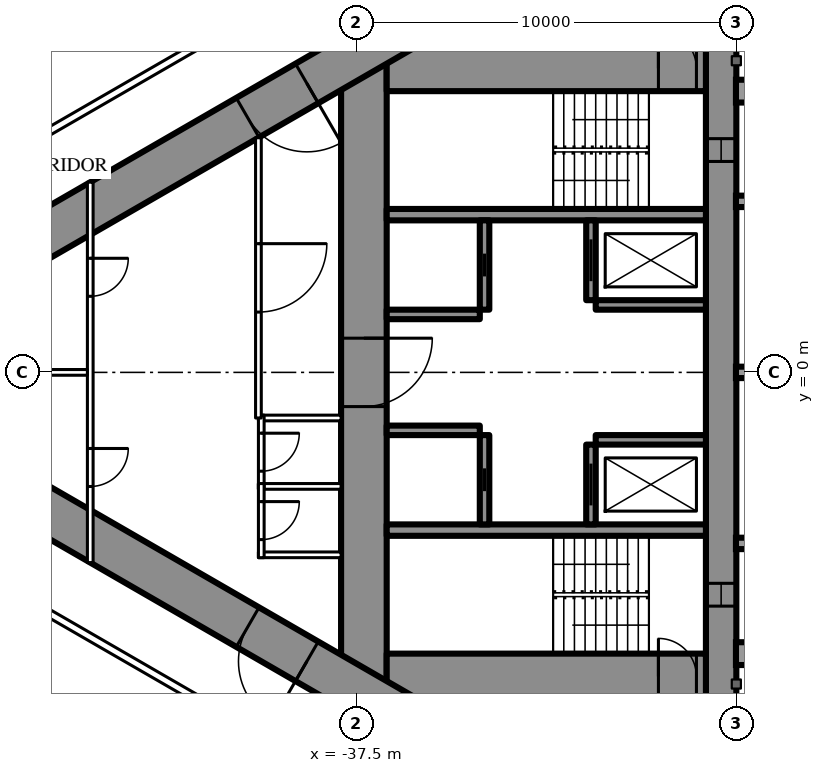
"""IFC4 building model, lengths in metres.
Left out: names, types, materials, properties, quantities, classifications, styles, units other than length and angle.
Written with IfcOpenShell. Run it as: python <this file> out.ifc"""

import sys

from ifc_helpers import new_model, si_unit, direction, frame, frame_2d, origin, place, context, subcontext, project, spatial, rectangle, extrude, element, fill, save


model = new_model("IFC4")
c1 = context("Model", 3, precision=1e-05, world=origin(), true_north=direction((0.0, 1.0)))
c2 = subcontext(c1, "Body", "Model", "MODEL_VIEW")
j1 = project(units=[si_unit("LENGTHUNIT", "METRE"), si_unit("PLANEANGLEUNIT", "RADIAN")], contexts=[c1])
p1 = place(None, origin())
s1 = spatial("IfcSite", under=j1, at=p1, CompositionType="ELEMENT")
p2 = place(p1, origin())
s2 = spatial("IfcBuilding", under=s1, at=p2, CompositionType="ELEMENT")
p3 = place(p2, frame((0.0, 0.0, 111.6)))
s3 = spatial("IfcBuildingStorey", under=s2, at=p3, CompositionType="ELEMENT", Elevation=111.6)
p4 = place(p3, frame((-27.9, 8.6, 0.0), z_axis=(0.0, 0.0, 1.0), x_axis=(0.0, -1.0, 0.0)))
e1 = element("IfcWall", 1, at=p4, inside=s3, PredefinedType="SHEAR", context=c2, shape_type="SweptSolid", body=[
    extrude(rectangle(XDim=17.2, YDim=0.8, at=frame_2d((8.6, 0.0))), origin(), (0.0, 0.0, 1.0), 3.5),
])
p5 = place(p4, frame((2.45, 0.0, 0.6)))
e2 = element("IfcOpeningElement", 2, at=p5, cuts=e1, PredefinedType="OPENING", context=c2, shape_type="SweptSolid", body=[
    extrude(rectangle(XDim=0.6, YDim=2.1, at=frame_2d((0.3, 1.05))), frame((0.0, 0.41, 0.0), z_axis=(0.0, -1.0, 0.0), x_axis=(1.0, 0.0, 0.0)), (0.0, 0.0, 1.0), 0.82),
])
p6 = place(p4, frame((14.15, 0.0, 0.6)))
e3 = element("IfcOpeningElement", 3, at=p6, cuts=e1, PredefinedType="OPENING", context=c2, shape_type="SweptSolid", body=[
    extrude(rectangle(XDim=0.6, YDim=2.1, at=frame_2d((0.3, 1.05))), frame((0.0, 0.41, 0.0), z_axis=(0.0, -1.0, 0.0), x_axis=(1.0, 0.0, 0.0)), (0.0, 0.0, 1.0), 0.82),
])
p7 = place(p3, frame((-37.3, 8.6, 0.0), z_axis=(0.0, 0.0, 1.0), x_axis=(0.0, -1.0, 0.0)))
e4 = element("IfcWall", 4, at=p7, inside=s3, PredefinedType="SHEAR", context=c2, shape_type="SweptSolid", body=[
    extrude(rectangle(XDim=17.2, YDim=1.2, at=frame_2d((8.6, 0.0))), origin(), (0.0, 0.0, 1.0), 3.5),
])
p8 = place(p7, frame((7.7, 0.0, 0.0)))
e5 = element("IfcOpeningElement", 5, at=p8, cuts=e4, PredefinedType="OPENING", context=c2, shape_type="SweptSolid", body=[
    extrude(rectangle(XDim=1.8, YDim=2.2, at=frame_2d((0.9, 1.1))), frame((0.0, 0.61, 0.0), z_axis=(0.0, -1.0, 0.0), x_axis=(1.0, 0.0, 0.0)), (0.0, 0.0, 1.0), 1.22),
])
p9 = place(p3, frame((-28.3, 8.0, 0.0), z_axis=(0.0, 0.0, 1.0), x_axis=(-1.0, 0.0, 0.0)))
e6 = element("IfcWall", 6, at=p9, inside=s3, PredefinedType="SHEAR", context=c2, shape_type="SweptSolid", body=[
    extrude(rectangle(XDim=8.4, YDim=1.2, at=frame_2d((4.2, 0.0))), origin(), (0.0, 0.0, 1.0), 3.5),
])
p10 = place(p9, frame((0.25, 0.0, 0.0)))
e7 = element("IfcOpeningElement", 7, at=p10, cuts=e6, PredefinedType="OPENING", context=c2, shape_type="SweptSolid", body=[
    extrude(rectangle(XDim=1.0, YDim=2.2, at=frame_2d((0.5, 1.1))), frame((0.0, 0.61, 0.0), z_axis=(0.0, -1.0, 0.0), x_axis=(1.0, 0.0, 0.0)), (0.0, 0.0, 1.0), 1.22),
])
p11 = place(p3, frame((-28.3, -8.0, 0.0), z_axis=(0.0, 0.0, 1.0), x_axis=(-1.0, 0.0, 0.0)))
e8 = element("IfcWall", 8, at=p11, inside=s3, PredefinedType="SHEAR", context=c2, shape_type="SweptSolid", body=[
    extrude(rectangle(XDim=8.4, YDim=1.2, at=frame_2d((4.2, 0.0))), origin(), (0.0, 0.0, 1.0), 3.5),
])
p12 = place(p11, frame((0.25, 0.0, 0.0)))
e9 = element("IfcOpeningElement", 9, at=p12, cuts=e8, PredefinedType="OPENING", context=c2, shape_type="SweptSolid", body=[
    extrude(rectangle(XDim=1.0, YDim=2.2, at=frame_2d((0.5, 1.1))), frame((0.0, 0.61, 0.0), z_axis=(0.0, -1.0, 0.0), x_axis=(1.0, 0.0, 0.0)), (0.0, 0.0, 1.0), 1.22),
])
for number, where, z_axis, x_axis in (
    (10, (-28.3, 4.15, 0.0), (0.0, 0.0, 1.0), (-1.0, 0.0, 0.0)),
    (11, (-28.3, -4.15, 0.0), (0.0, 0.0, 1.0), (-1.0, 0.0, 0.0)),
):
    element("IfcWall", number, at=place(p3, frame(where, z_axis=z_axis, x_axis=x_axis)), inside=s3, PredefinedType="SHEAR", context=c2, shape_type="SweptSolid", body=[
        extrude(rectangle(XDim=8.4, YDim=0.3, at=frame_2d((4.2, 0.0))), origin(), (0.0, 0.0, 1.0), 3.5),
    ])
p13 = place(p3, frame((-31.325, 4.0, 0.0), z_axis=(0.0, 0.0, 1.0), x_axis=(0.0, -1.0, 0.0)))
e12 = element("IfcWall", 12, at=p13, inside=s3, PredefinedType="SHEAR", context=c2, shape_type="SweptSolid", body=[
    extrude(rectangle(XDim=2.1, YDim=0.25, at=frame_2d((1.05, 0.0))), origin(), (0.0, 0.0, 1.0), 3.5),
])
p14 = place(p13, frame((0.5, 0.0, 0.0)))
e13 = element("IfcOpeningElement", 13, at=p14, cuts=e12, PredefinedType="OPENING", context=c2, shape_type="SweptSolid", body=[
    extrude(rectangle(XDim=1.1, YDim=2.2, at=frame_2d((0.55, 1.1))), frame((0.0, 0.135, 0.0), z_axis=(0.0, -1.0, 0.0), x_axis=(1.0, 0.0, 0.0)), (0.0, 0.0, 1.0), 0.27),
])
p15 = place(p3, frame((-34.125, 4.0, 0.0), z_axis=(0.0, 0.0, 1.0), x_axis=(0.0, -1.0, 0.0)))
e14 = element("IfcWall", 14, at=p15, inside=s3, PredefinedType="SHEAR", context=c2, shape_type="SweptSolid", body=[
    extrude(rectangle(XDim=2.35, YDim=0.25, at=frame_2d((1.175, 0.0))), origin(), (0.0, 0.0, 1.0), 3.5),
])
p16 = place(p15, frame((0.875, 0.0, 0.0)))
e15 = element("IfcOpeningElement", 15, at=p16, cuts=e14, PredefinedType="OPENING", context=c2, shape_type="SweptSolid", body=[
    extrude(rectangle(XDim=0.6, YDim=2.0, at=frame_2d((0.3, 1.0))), frame((0.0, 0.135, 0.0), z_axis=(0.0, -1.0, 0.0), x_axis=(1.0, 0.0, 0.0)), (0.0, 0.0, 1.0), 0.27),
])
p17 = place(p3, frame((-28.3, 1.775, 0.0), z_axis=(0.0, 0.0, 1.0), x_axis=(-1.0, 0.0, 0.0)))
e16 = element("IfcWall", 16, at=p17, inside=s3, PredefinedType="SHEAR", context=c2, shape_type="SweptSolid", body=[
    extrude(rectangle(XDim=2.9, YDim=0.25, at=frame_2d((1.45, 0.0))), origin(), (0.0, 0.0, 1.0), 3.5),
])
p18 = place(p3, frame((-34.25, 1.525, 0.0), z_axis=(0.0, 0.0, 1.0), x_axis=(-1.0, 0.0, 0.0)))
e17 = element("IfcWall", 17, at=p18, inside=s3, PredefinedType="SHEAR", context=c2, shape_type="SweptSolid", body=[
    extrude(rectangle(XDim=2.45, YDim=0.25, at=frame_2d((1.225, 0.0))), origin(), (0.0, 0.0, 1.0), 3.5),
])
p19 = place(p3, frame((-31.325, -1.9, 0.0), z_axis=(0.0, 0.0, 1.0), x_axis=(0.0, -1.0, 0.0)))
e18 = element("IfcWall", 18, at=p19, inside=s3, PredefinedType="SHEAR", context=c2, shape_type="SweptSolid", body=[
    extrude(rectangle(XDim=2.1, YDim=0.25, at=frame_2d((1.05, 0.0))), origin(), (0.0, 0.0, 1.0), 3.5),
])
p20 = place(p19, frame((0.5, 0.0, 0.0)))
e19 = element("IfcOpeningElement", 19, at=p20, cuts=e18, PredefinedType="OPENING", context=c2, shape_type="SweptSolid", body=[
    extrude(rectangle(XDim=1.1, YDim=2.2, at=frame_2d((0.55, 1.1))), frame((0.0, 0.135, 0.0), z_axis=(0.0, -1.0, 0.0), x_axis=(1.0, 0.0, 0.0)), (0.0, 0.0, 1.0), 0.27),
])
p21 = place(p3, frame((-34.125, -1.65, 0.0), z_axis=(0.0, 0.0, 1.0), x_axis=(0.0, -1.0, 0.0)))
e20 = element("IfcWall", 20, at=p21, inside=s3, PredefinedType="SHEAR", context=c2, shape_type="SweptSolid", body=[
    extrude(rectangle(XDim=2.35, YDim=0.25, at=frame_2d((1.175, 0.0))), origin(), (0.0, 0.0, 1.0), 3.5),
])
p22 = place(p21, frame((0.875, 0.0, 0.0)))
e21 = element("IfcOpeningElement", 21, at=p22, cuts=e20, PredefinedType="OPENING", context=c2, shape_type="SweptSolid", body=[
    extrude(rectangle(XDim=0.6, YDim=2.0, at=frame_2d((0.3, 1.0))), frame((0.0, 0.135, 0.0), z_axis=(0.0, -1.0, 0.0), x_axis=(1.0, 0.0, 0.0)), (0.0, 0.0, 1.0), 0.27),
])
p23 = place(p3, frame((-28.3, -1.775, 0.0), z_axis=(0.0, 0.0, 1.0), x_axis=(-1.0, 0.0, 0.0)))
e22 = element("IfcWall", 22, at=p23, inside=s3, PredefinedType="SHEAR", context=c2, shape_type="SweptSolid", body=[
    extrude(rectangle(XDim=2.9, YDim=0.25, at=frame_2d((1.45, 0.0))), origin(), (0.0, 0.0, 1.0), 3.5),
])
p24 = place(p3, frame((-34.25, -1.525, 0.0), z_axis=(0.0, 0.0, 1.0), x_axis=(-1.0, 0.0, 0.0)))
e23 = element("IfcWall", 23, at=p24, inside=s3, PredefinedType="SHEAR", context=c2, shape_type="SweptSolid", body=[
    extrude(rectangle(XDim=2.45, YDim=0.25, at=frame_2d((1.225, 0.0))), origin(), (0.0, 0.0, 1.0), 3.5),
])
p25 = place(p3, frame((-27.2, 14.3, 0.0), z_axis=(0.0, 0.0, 1.0), x_axis=(-0.866026593062, -0.499997940104, 0.0)))
e24 = element("IfcWall", 24, at=p25, inside=s3, PredefinedType="SHEAR", context=c2, shape_type="SweptSolid", body=[
    extrude(rectangle(XDim=28.946, YDim=1.2, at=frame_2d((14.473, 0.0))), origin(), (0.0, 0.0, 1.0), 3.5),
])
p26 = place(p25, frame((4.6, 0.0, 0.0)))
e25 = element("IfcOpeningElement", 25, at=p26, cuts=e24, PredefinedType="OPENING", context=c2, shape_type="SweptSolid", body=[
    extrude(rectangle(XDim=1.0, YDim=2.2, at=frame_2d((0.5, 1.1))), frame((0.0, 0.61, 0.0), z_axis=(0.0, -1.0, 0.0), x_axis=(1.0, 0.0, 0.0)), (0.0, 0.0, 1.0), 1.22),
])
p27 = place(p25, frame((13.395, 0.0, 0.0)))
e26 = element("IfcOpeningElement", 26, at=p27, cuts=e24, PredefinedType="OPENING", context=c2, shape_type="SweptSolid", body=[
    extrude(rectangle(XDim=1.8, YDim=2.2, at=frame_2d((0.9, 1.1))), frame((0.0, 0.61, 0.0), z_axis=(0.0, -1.0, 0.0), x_axis=(1.0, 0.0, 0.0)), (0.0, 0.0, 1.0), 1.22),
])
p28 = place(p3, frame((-27.2, -14.3, 0.0), z_axis=(0.0, 0.0, 1.0), x_axis=(-0.866024021859, 0.500002393557, 0.0)))
e27 = element("IfcWall", 27, at=p28, inside=s3, PredefinedType="SHEAR", context=c2, shape_type="SweptSolid", body=[
    extrude(rectangle(XDim=27.907, YDim=1.2, at=frame_2d((13.954, 0.0))), origin(), (0.0, 0.0, 1.0), 3.5),
])
p29 = place(p28, frame((4.6, 0.0, 0.0)))
e28 = element("IfcOpeningElement", 28, at=p29, cuts=e27, PredefinedType="OPENING", context=c2, shape_type="SweptSolid", body=[
    extrude(rectangle(XDim=1.0, YDim=2.2, at=frame_2d((0.5, 1.1))), frame((0.0, 0.61, 0.0), z_axis=(0.0, -1.0, 0.0), x_axis=(1.0, 0.0, 0.0)), (0.0, 0.0, 1.0), 1.22),
])
p30 = place(p28, frame((13.395, 0.0, 0.0)))
e29 = element("IfcOpeningElement", 29, at=p30, cuts=e27, PredefinedType="OPENING", context=c2, shape_type="SweptSolid", body=[
    extrude(rectangle(XDim=1.8, YDim=2.2, at=frame_2d((0.9, 1.1))), frame((0.0, 0.61, 0.0), z_axis=(0.0, -1.0, 0.0), x_axis=(1.0, 0.0, 0.0)), (0.0, 0.0, 1.0), 1.22),
])
p31 = place(p3, frame((-37.7, 10.894, 0.0), z_axis=(0.0, 0.0, 1.0), x_axis=(-0.866027905338, -0.499995667157, 0.0)))
e30 = element("IfcWall", 30, at=p31, inside=s3, PredefinedType="PARTITIONING", context=c2, shape_type="SweptSolid", body=[
    extrude(rectangle(XDim=21.787, YDim=0.2, at=frame_2d((10.894, 0.0))), origin(), (0.0, 0.0, 1.0), 3.25),
])
p32 = place(p31, frame((11.23, 0.0, 0.0)))
e31 = element("IfcOpeningElement", 31, at=p32, cuts=e30, PredefinedType="OPENING", context=c2, shape_type="SweptSolid", body=[
    extrude(rectangle(XDim=0.95, YDim=2.2, at=frame_2d((0.475, 1.1))), frame((0.0, 0.11, 0.0), z_axis=(0.0, -1.0, 0.0), x_axis=(1.0, 0.0, 0.0)), (0.0, 0.0, 1.0), 0.22),
])
p33 = place(p31, frame((9.531, 0.0, 0.0)))
e32 = element("IfcOpeningElement", 32, at=p33, cuts=e30, PredefinedType="OPENING", context=c2, shape_type="SweptSolid", body=[
    extrude(rectangle(XDim=0.95, YDim=2.2, at=frame_2d((0.475, 1.1))), frame((0.0, 0.11, 0.0), z_axis=(0.0, -1.0, 0.0), x_axis=(1.0, 0.0, 0.0)), (0.0, 0.0, 1.0), 0.22),
])
p34 = place(p3, frame((-36.92, -11.344, 0.0), z_axis=(0.0, 0.0, 1.0), x_axis=(-0.866027897759, 0.499995680284, 0.0)))
e33 = element("IfcWall", 33, at=p34, inside=s3, PredefinedType="PARTITIONING", context=c2, shape_type="SweptSolid", body=[
    extrude(rectangle(XDim=11.731, YDim=0.2, at=frame_2d((5.865, 0.0))), origin(), (0.0, 0.0, 1.0), 3.25),
])
p35 = place(p34, frame((3.35, 0.0, 0.0)))
e34 = element("IfcOpeningElement", 34, at=p35, cuts=e33, PredefinedType="OPENING", context=c2, shape_type="SweptSolid", body=[
    extrude(rectangle(XDim=1.0, YDim=2.2, at=frame_2d((0.5, 1.1))), frame((0.0, 0.11, 0.0), z_axis=(0.0, -1.0, 0.0), x_axis=(1.0, 0.0, 0.0)), (0.0, 0.0, 1.0), 0.22),
])
for number, where, z_axis, x_axis in (
    (35, (-37.9, -1.2, 0.0), (0.0, 0.0, 1.0), (-1.0, 0.0, 0.0)),
    (36, (-37.9, -3.0, 0.0), (0.0, 0.0, 1.0), (-1.0, 0.0, 0.0)),
    (37, (-37.9, -4.8, 0.0), (0.0, 0.0, 1.0), (-1.0, 0.0, 0.0)),
):
    element("IfcWall", number, at=place(p3, frame(where, z_axis=z_axis, x_axis=x_axis)), inside=s3, PredefinedType="PARTITIONING", context=c2, shape_type="SweptSolid", body=[
        extrude(rectangle(XDim=2.175, YDim=0.15, at=frame_2d((1.087, 0.0))), origin(), (0.0, 0.0, 1.0), 3.25),
    ])
p36 = place(p3, frame((-40.0, -1.125, 0.0), z_axis=(0.0, 0.0, 1.0), x_axis=(0.0, -1.0, 0.0)))
e38 = element("IfcWall", 38, at=p36, inside=s3, PredefinedType="PARTITIONING", context=c2, shape_type="SweptSolid", body=[
    extrude(rectangle(XDim=1.95, YDim=0.15, at=frame_2d((0.975, 0.0))), origin(), (0.0, 0.0, 1.0), 3.25),
])
p37 = place(p36, frame((0.475, 0.0, 0.0)))
e39 = element("IfcOpeningElement", 39, at=p37, cuts=e38, PredefinedType="OPENING", context=c2, shape_type="SweptSolid", body=[
    extrude(rectangle(XDim=1.0, YDim=2.2, at=frame_2d((0.5, 1.1))), frame((0.0, 0.085, 0.0), z_axis=(0.0, -1.0, 0.0), x_axis=(1.0, 0.0, 0.0)), (0.0, 0.0, 1.0), 0.17),
])
p38 = place(p3, frame((-40.0, -2.925, 0.0), z_axis=(0.0, 0.0, 1.0), x_axis=(0.0, -1.0, 0.0)))
e40 = element("IfcWall", 40, at=p38, inside=s3, PredefinedType="PARTITIONING", context=c2, shape_type="SweptSolid", body=[
    extrude(rectangle(XDim=1.95, YDim=0.15, at=frame_2d((0.975, 0.0))), origin(), (0.0, 0.0, 1.0), 3.25),
])
p39 = place(p38, frame((0.475, 0.0, 0.0)))
e41 = element("IfcOpeningElement", 41, at=p39, cuts=e40, PredefinedType="OPENING", context=c2, shape_type="SweptSolid", body=[
    extrude(rectangle(XDim=1.0, YDim=2.2, at=frame_2d((0.5, 1.1))), frame((0.0, 0.085, 0.0), z_axis=(0.0, -1.0, 0.0), x_axis=(1.0, 0.0, 0.0)), (0.0, 0.0, 1.0), 0.17),
])
p40 = place(p3, frame((-40.075, 6.174, 0.0), z_axis=(0.0, 0.0, 1.0), x_axis=(0.0, -1.0, 0.0)))
e42 = element("IfcWall", 42, at=p40, inside=s3, PredefinedType="PARTITIONING", context=c2, shape_type="SweptSolid", body=[
    extrude(rectangle(XDim=7.374, YDim=0.15, at=frame_2d((3.687, 0.0))), origin(), (0.0, 0.0, 1.0), 3.25),
])
p41 = place(p40, frame((2.787, 0.0, 0.0)))
e43 = element("IfcOpeningElement", 43, at=p41, cuts=e42, PredefinedType="OPENING", context=c2, shape_type="SweptSolid", body=[
    extrude(rectangle(XDim=1.8, YDim=2.2, at=frame_2d((0.9, 1.1))), frame((0.0, 0.085, 0.0), z_axis=(0.0, -1.0, 0.0), x_axis=(1.0, 0.0, 0.0)), (0.0, 0.0, 1.0), 0.17),
])
p42 = place(p3, frame((-44.5, 5.005, 0.0), z_axis=(0.0, 0.0, 1.0), x_axis=(0.0, -1.0, 0.0)))
e44 = element("IfcWall", 44, at=p42, inside=s3, PredefinedType="PARTITIONING", context=c2, shape_type="SweptSolid", body=[
    extrude(rectangle(XDim=10.009, YDim=0.15, at=frame_2d((5.005, 0.0))), origin(), (0.0, 0.0, 1.0), 2.45),
])
p43 = place(p42, frame((2.002, 0.0, 0.0)))
e45 = element("IfcOpeningElement", 45, at=p43, cuts=e44, PredefinedType="OPENING", context=c2, shape_type="SweptSolid", body=[
    extrude(rectangle(XDim=1.0, YDim=2.2, at=frame_2d((0.5, 1.1))), frame((0.0, 0.085, 0.0), z_axis=(0.0, -1.0, 0.0), x_axis=(1.0, 0.0, 0.0)), (0.0, 0.0, 1.0), 0.17),
])
p44 = place(p42, frame((7.007, 0.0, 0.0)))
e46 = element("IfcOpeningElement", 46, at=p44, cuts=e44, PredefinedType="OPENING", context=c2, shape_type="SweptSolid", body=[
    extrude(rectangle(XDim=1.0, YDim=2.2, at=frame_2d((0.5, 1.1))), frame((0.0, 0.085, 0.0), z_axis=(0.0, -1.0, 0.0), x_axis=(1.0, 0.0, 0.0)), (0.0, 0.0, 1.0), 0.17),
])
p45 = place(p3, frame((-44.575, 0.0, 0.0), z_axis=(0.0, 0.0, 1.0), x_axis=(-1.0, 0.0, 0.0)))
e47 = element("IfcWall", 47, at=p45, inside=s3, PredefinedType="PARTITIONING", context=c2, shape_type="SweptSolid", body=[
    extrude(rectangle(XDim=8.593, YDim=0.15, at=frame_2d((4.297, 0.0))), origin(), (0.0, 0.0, 1.0), 2.2),
])
p46 = place(p37, origin())
e48 = element("IfcDoor", 48, at=p46, inside=s3, OperationType="SINGLE_SWING_LEFT", PredefinedType="DOOR", context=c2, shape_type="SweptSolid", body=[
    extrude(rectangle(XDim=1.0, YDim=2.2, at=frame_2d((0.5, 1.1))), frame((0.0, 0.025, 0.0), z_axis=(0.0, -1.0, 0.0), x_axis=(1.0, 0.0, 0.0)), (0.0, 0.0, 1.0), 0.05),
])
fill(e39, e48)
p47 = place(p39, origin())
e49 = element("IfcDoor", 49, at=p47, inside=s3, OperationType="SINGLE_SWING_LEFT", PredefinedType="DOOR", context=c2, shape_type="SweptSolid", body=[
    extrude(rectangle(XDim=1.0, YDim=2.2, at=frame_2d((0.5, 1.1))), frame((0.0, 0.025, 0.0), z_axis=(0.0, -1.0, 0.0), x_axis=(1.0, 0.0, 0.0)), (0.0, 0.0, 1.0), 0.05),
])
fill(e41, e49)
p48 = place(p41, origin())
e50 = element("IfcDoor", 50, at=p48, inside=s3, OperationType="DOUBLE_DOOR_SINGLE_SWING", PredefinedType="DOOR", context=c2, shape_type="SweptSolid", body=[
    extrude(rectangle(XDim=1.8, YDim=2.2, at=frame_2d((0.9, 1.1))), frame((0.0, 0.025, 0.0), z_axis=(0.0, -1.0, 0.0), x_axis=(1.0, 0.0, 0.0)), (0.0, 0.0, 1.0), 0.05),
])
fill(e43, e50)
p49 = place(p43, origin())
e51 = element("IfcDoor", 51, at=p49, inside=s3, OperationType="SINGLE_SWING_LEFT", PredefinedType="DOOR", context=c2, shape_type="SweptSolid", body=[
    extrude(rectangle(XDim=1.0, YDim=2.2, at=frame_2d((0.5, 1.1))), frame((0.0, 0.025, 0.0), z_axis=(0.0, -1.0, 0.0), x_axis=(1.0, 0.0, 0.0)), (0.0, 0.0, 1.0), 0.05),
])
fill(e45, e51)
p50 = place(p44, origin())
e52 = element("IfcDoor", 52, at=p50, inside=s3, OperationType="SINGLE_SWING_LEFT", PredefinedType="DOOR", context=c2, shape_type="SweptSolid", body=[
    extrude(rectangle(XDim=1.0, YDim=2.2, at=frame_2d((0.5, 1.1))), frame((0.0, 0.025, 0.0), z_axis=(0.0, -1.0, 0.0), x_axis=(1.0, 0.0, 0.0)), (0.0, 0.0, 1.0), 0.05),
])
fill(e46, e52)
p51 = place(p27, origin())
e53 = element("IfcDoor", 53, at=p51, inside=s3, OperationType="DOUBLE_DOOR_SINGLE_SWING", PredefinedType="DOOR", context=c2, shape_type="SweptSolid", body=[
    extrude(rectangle(XDim=1.8, YDim=2.2, at=frame_2d((0.9, 1.1))), frame((0.0, 0.025, 0.0), z_axis=(0.0, -1.0, 0.0), x_axis=(1.0, 0.0, 0.0)), (0.0, 0.0, 1.0), 0.05),
])
fill(e26, e53)
p52 = place(p30, origin())
e54 = element("IfcDoor", 54, at=p52, inside=s3, OperationType="DOUBLE_DOOR_SINGLE_SWING", PredefinedType="DOOR", context=c2, shape_type="SweptSolid", body=[
    extrude(rectangle(XDim=1.8, YDim=2.2, at=frame_2d((0.9, 1.1))), frame((0.0, 0.025, 0.0), z_axis=(0.0, -1.0, 0.0), x_axis=(1.0, 0.0, 0.0)), (0.0, 0.0, 1.0), 0.05),
])
fill(e29, e54)
p53 = place(p8, origin())
e55 = element("IfcDoor", 55, at=p53, inside=s3, OperationType="DOUBLE_DOOR_SINGLE_SWING", PredefinedType="DOOR", context=c2, shape_type="SweptSolid", body=[
    extrude(rectangle(XDim=1.8, YDim=2.2, at=frame_2d((0.9, 1.1))), frame((0.0, 0.025, 0.0), z_axis=(0.0, -1.0, 0.0), x_axis=(1.0, 0.0, 0.0)), (0.0, 0.0, 1.0), 0.05),
])
fill(e5, e55)
p54 = place(p10, origin())
e56 = element("IfcDoor", 56, at=p54, inside=s3, OperationType="SINGLE_SWING_RIGHT", PredefinedType="DOOR", context=c2, shape_type="SweptSolid", body=[
    extrude(rectangle(XDim=1.0, YDim=2.2, at=frame_2d((0.5, 1.1))), frame((0.0, 0.025, 0.0), z_axis=(0.0, -1.0, 0.0), x_axis=(1.0, 0.0, 0.0)), (0.0, 0.0, 1.0), 0.05),
])
fill(e7, e56)
p55 = place(p12, origin())
e57 = element("IfcDoor", 57, at=p55, inside=s3, OperationType="SINGLE_SWING_RIGHT", PredefinedType="DOOR", context=c2, shape_type="SweptSolid", body=[
    extrude(rectangle(XDim=1.0, YDim=2.2, at=frame_2d((0.5, 1.1))), frame((0.0, 0.025, 0.0), z_axis=(0.0, -1.0, 0.0), x_axis=(1.0, 0.0, 0.0)), (0.0, 0.0, 1.0), 0.05),
])
fill(e9, e57)
p56 = place(p14, origin())
e58 = element("IfcDoor", 58, at=p56, inside=s3, OperationType="SLIDING_TO_LEFT", PredefinedType="USERDEFINED", context=c2, shape_type="SweptSolid", body=[
    extrude(rectangle(XDim=1.1, YDim=2.2, at=frame_2d((0.55, 1.1))), frame((0.0, 0.025, 0.0), z_axis=(0.0, -1.0, 0.0), x_axis=(1.0, 0.0, 0.0)), (0.0, 0.0, 1.0), 0.05),
])
fill(e13, e58)
p57 = place(p20, origin())
e59 = element("IfcDoor", 59, at=p57, inside=s3, OperationType="SLIDING_TO_LEFT", PredefinedType="USERDEFINED", context=c2, shape_type="SweptSolid", body=[
    extrude(rectangle(XDim=1.1, YDim=2.2, at=frame_2d((0.55, 1.1))), frame((0.0, 0.025, 0.0), z_axis=(0.0, -1.0, 0.0), x_axis=(1.0, 0.0, 0.0)), (0.0, 0.0, 1.0), 0.05),
])
fill(e19, e59)
p58 = place(p16, origin())
e60 = element("IfcDoor", 60, at=p58, inside=s3, OperationType="SLIDING_TO_LEFT", PredefinedType="DOOR", context=c2, shape_type="SweptSolid", body=[
    extrude(rectangle(XDim=0.6, YDim=2.0, at=frame_2d((0.3, 1.0))), frame((0.0, 0.025, 0.0), z_axis=(0.0, -1.0, 0.0), x_axis=(1.0, 0.0, 0.0)), (0.0, 0.0, 1.0), 0.05),
])
fill(e15, e60)
p59 = place(p22, origin())
e61 = element("IfcDoor", 61, at=p59, inside=s3, OperationType="SLIDING_TO_LEFT", PredefinedType="DOOR", context=c2, shape_type="SweptSolid", body=[
    extrude(rectangle(XDim=0.6, YDim=2.0, at=frame_2d((0.3, 1.0))), frame((0.0, 0.025, 0.0), z_axis=(0.0, -1.0, 0.0), x_axis=(1.0, 0.0, 0.0)), (0.0, 0.0, 1.0), 0.05),
])
fill(e21, e61)
p60 = place(p5, origin())
e62 = element("IfcWindow", 62, at=p60, inside=s3, PartitioningType="SINGLE_PANEL", PredefinedType="WINDOW", context=c2, shape_type="SweptSolid", body=[
    extrude(rectangle(XDim=0.6, YDim=2.1, at=frame_2d((0.3, 1.05))), frame((0.0, 0.03, 0.0), z_axis=(0.0, -1.0, 0.0), x_axis=(1.0, 0.0, 0.0)), (0.0, 0.0, 1.0), 0.06),
])
fill(e2, e62)
p61 = place(p6, origin())
e63 = element("IfcWindow", 63, at=p61, inside=s3, PartitioningType="SINGLE_PANEL", PredefinedType="WINDOW", context=c2, shape_type="SweptSolid", body=[
    extrude(rectangle(XDim=0.6, YDim=2.1, at=frame_2d((0.3, 1.05))), frame((0.0, 0.03, 0.0), z_axis=(0.0, -1.0, 0.0), x_axis=(1.0, 0.0, 0.0)), (0.0, 0.0, 1.0), 0.06),
])
fill(e3, e63)
save(model, sys.argv[1])
